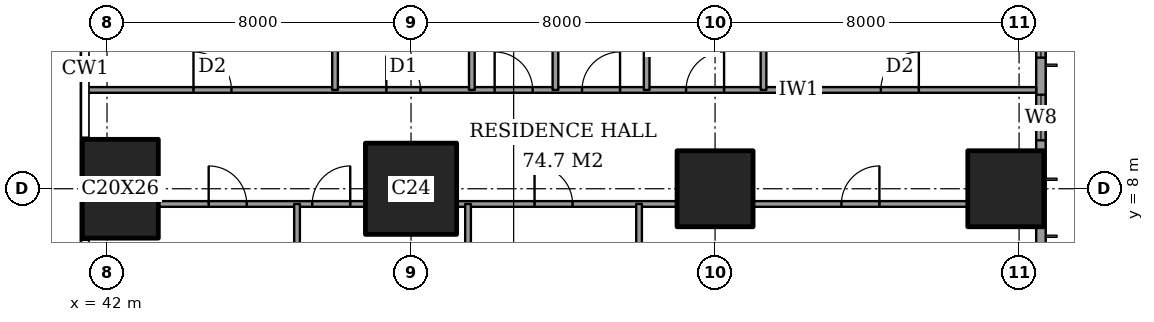
"""IFC4 building model, lengths in metres.
Left out: names, types, materials, properties, quantities, classifications, styles, units other than length and angle.
Written with IfcOpenShell. Run it as: python <this file> out.ifc"""

import sys

from ifc_helpers import new_model, si_unit, direction, frame, frame_2d, origin, origin_2d, place, context, subcontext, project, spatial, rectangle, extrude, element, fill, save


model = new_model("IFC4")
c1 = context("Model", 3, precision=1e-05, world=origin(), true_north=direction((0.0, 1.0)))
c2 = subcontext(c1, "Body", "Model", "MODEL_VIEW")
j1 = project(units=[si_unit("LENGTHUNIT", "METRE"), si_unit("PLANEANGLEUNIT", "RADIAN")], contexts=[c1])
p1 = place(None, origin())
s1 = spatial("IfcSite", under=j1, at=p1, CompositionType="ELEMENT")
p2 = place(p1, origin())
s2 = spatial("IfcBuilding", under=s1, at=p2, CompositionType="ELEMENT")
p3 = place(p2, frame((0.0, 0.0, 33.2)))
s3 = spatial("IfcBuildingStorey", under=s2, at=p3, CompositionType="ELEMENT", Elevation=33.2)
p4 = place(p3, frame((42.35, 8.0, 0.0), z_axis=(0.0, 0.0, 1.0), x_axis=(1.0, 0.0, 0.0)))
e1 = element("IfcColumn", 1, at=p4, inside=s3, PredefinedType="COLUMN", context=c2, shape_type="SweptSolid", body=[
    extrude(rectangle(XDim=2.0, YDim=2.6, at=origin_2d()), origin(), (0.0, 0.0, 1.0), 3.6),
])
p5 = place(p3, frame((50.0, 8.0, 0.0), z_axis=(0.0, 0.0, 1.0), x_axis=(1.0, 0.0, 0.0)))
e2 = element("IfcColumn", 2, at=p5, inside=s3, PredefinedType="COLUMN", context=c2, shape_type="SweptSolid", body=[
    extrude(rectangle(XDim=2.4, YDim=2.4, at=origin_2d()), origin(), (0.0, 0.0, 1.0), 3.6),
])
for number, where, z_axis, x_axis in (
    (3, (58.0, 8.0, 0.0), (0.0, 0.0, 1.0), (1.0, 0.0, 0.0)),
    (4, (65.65, 8.0, 0.0), (0.0, 0.0, 1.0), (1.0, 0.0, 0.0)),
):
    element("IfcColumn", number, at=place(p3, frame(where, z_axis=z_axis, x_axis=x_axis)), inside=s3, PredefinedType="COLUMN", context=c2, shape_type="SweptSolid", body=[
        extrude(rectangle(XDim=2.0, YDim=2.0, at=origin_2d()), origin(), (0.0, 0.0, 1.0), 3.6),
    ])
p6 = place(p3, frame((66.575, 3.175, 0.0), z_axis=(0.0, 0.0, 1.0), x_axis=(0.0, 1.0, 0.0)))
e5 = element("IfcWall", 5, at=p6, inside=s3, PredefinedType="SOLIDWALL", context=c2, shape_type="SweptSolid", body=[
    extrude(rectangle(XDim=41.65, YDim=0.25, at=frame_2d((20.825, 0.0))), origin(), (0.0, 0.0, 1.0), 3.6),
])
p7 = place(p6, frame((0.775, 0.0, 0.6)))
e6 = element("IfcOpeningElement", 6, at=p7, cuts=e5, PredefinedType="OPENING", context=c2, shape_type="SweptSolid", body=[
    extrude(rectangle(XDim=2.4, YDim=2.0, at=frame_2d((1.2, 1.0))), frame((0.0, 0.135, 0.0), z_axis=(0.0, -1.0, 0.0), x_axis=(1.0, 0.0, 0.0)), (0.0, 0.0, 1.0), 0.27),
])
p8 = place(p6, frame((6.1, 0.0, 0.6)))
e7 = element("IfcOpeningElement", 7, at=p8, cuts=e5, PredefinedType="OPENING", context=c2, shape_type="SweptSolid", body=[
    extrude(rectangle(XDim=1.2, YDim=2.0, at=frame_2d((0.6, 1.0))), frame((0.0, 0.135, 0.0), z_axis=(0.0, -1.0, 0.0), x_axis=(1.0, 0.0, 0.0)), (0.0, 0.0, 1.0), 0.27),
])
p9 = place(p6, frame((8.275, 0.0, 0.6)))
e8 = element("IfcOpeningElement", 8, at=p9, cuts=e5, PredefinedType="OPENING", context=c2, shape_type="SweptSolid", body=[
    extrude(rectangle(XDim=2.4, YDim=2.0, at=frame_2d((1.2, 1.0))), frame((0.0, 0.135, 0.0), z_axis=(0.0, -1.0, 0.0), x_axis=(1.0, 0.0, 0.0)), (0.0, 0.0, 1.0), 0.27),
])
p10 = place(p6, frame((15.775, 0.0, 0.6)))
e9 = element("IfcOpeningElement", 9, at=p10, cuts=e5, PredefinedType="OPENING", context=c2, shape_type="SweptSolid", body=[
    extrude(rectangle(XDim=2.4, YDim=2.0, at=frame_2d((1.2, 1.0))), frame((0.0, 0.135, 0.0), z_axis=(0.0, -1.0, 0.0), x_axis=(1.0, 0.0, 0.0)), (0.0, 0.0, 1.0), 0.27),
])
p11 = place(p6, frame((23.475, 0.0, 0.6)))
e10 = element("IfcOpeningElement", 10, at=p11, cuts=e5, PredefinedType="OPENING", context=c2, shape_type="SweptSolid", body=[
    extrude(rectangle(XDim=2.4, YDim=2.0, at=frame_2d((1.2, 1.0))), frame((0.0, 0.135, 0.0), z_axis=(0.0, -1.0, 0.0), x_axis=(1.0, 0.0, 0.0)), (0.0, 0.0, 1.0), 0.27),
])
p12 = place(p6, frame((30.975, 0.0, 0.6)))
e11 = element("IfcOpeningElement", 11, at=p12, cuts=e5, PredefinedType="OPENING", context=c2, shape_type="SweptSolid", body=[
    extrude(rectangle(XDim=2.4, YDim=2.0, at=frame_2d((1.2, 1.0))), frame((0.0, 0.135, 0.0), z_axis=(0.0, -1.0, 0.0), x_axis=(1.0, 0.0, 0.0)), (0.0, 0.0, 1.0), 0.27),
])
p13 = place(p6, frame((34.5, 0.0, 0.6)))
e12 = element("IfcOpeningElement", 12, at=p13, cuts=e5, PredefinedType="OPENING", context=c2, shape_type="SweptSolid", body=[
    extrude(rectangle(XDim=1.2, YDim=2.0, at=frame_2d((0.6, 1.0))), frame((0.0, 0.135, 0.0), z_axis=(0.0, -1.0, 0.0), x_axis=(1.0, 0.0, 0.0)), (0.0, 0.0, 1.0), 0.27),
])
p14 = place(p6, frame((38.475, 0.0, 0.6)))
e13 = element("IfcOpeningElement", 13, at=p14, cuts=e5, PredefinedType="OPENING", context=c2, shape_type="SweptSolid", body=[
    extrude(rectangle(XDim=2.4, YDim=2.0, at=frame_2d((1.2, 1.0))), frame((0.0, 0.135, 0.0), z_axis=(0.0, -1.0, 0.0), x_axis=(1.0, 0.0, 0.0)), (0.0, 0.0, 1.0), 0.27),
])
p15 = place(p3, frame((43.35, 7.6, 0.0), z_axis=(0.0, 0.0, 1.0), x_axis=(1.0, 0.0, 0.0)))
e14 = element("IfcWall", 14, at=p15, inside=s3, PredefinedType="PARTITIONING", context=c2, shape_type="SweptSolid", body=[
    extrude(rectangle(XDim=5.45, YDim=0.15, at=frame_2d((2.725, 0.0))), origin(), (0.0, 0.0, 1.0), 3.35),
])
p16 = place(p15, frame((4.05, 0.0, 0.0)))
e15 = element("IfcOpeningElement", 15, at=p16, cuts=e14, PredefinedType="OPENING", context=c2, shape_type="SweptSolid", body=[
    extrude(rectangle(XDim=1.0, YDim=2.1, at=frame_2d((0.5, 1.05))), frame((0.0, 0.085, 0.0), z_axis=(0.0, -1.0, 0.0), x_axis=(1.0, 0.0, 0.0)), (0.0, 0.0, 1.0), 0.17),
])
p17 = place(p15, frame((1.325, 0.0, 0.0)))
e16 = element("IfcOpeningElement", 16, at=p17, cuts=e14, PredefinedType="OPENING", context=c2, shape_type="SweptSolid", body=[
    extrude(rectangle(XDim=1.0, YDim=2.1, at=frame_2d((0.5, 1.05))), frame((0.0, 0.085, 0.0), z_axis=(0.0, -1.0, 0.0), x_axis=(1.0, 0.0, 0.0)), (0.0, 0.0, 1.0), 0.17),
])
p18 = place(p3, frame((51.2, 7.6, 0.0), z_axis=(0.0, 0.0, 1.0), x_axis=(1.0, 0.0, 0.0)))
e17 = element("IfcWall", 17, at=p18, inside=s3, PredefinedType="PARTITIONING", context=c2, shape_type="SweptSolid", body=[
    extrude(rectangle(XDim=5.8, YDim=0.15, at=frame_2d((2.9, 0.0))), origin(), (0.0, 0.0, 1.0), 3.35),
])
p19 = place(p18, frame((2.05, 0.0, 0.0)))
e18 = element("IfcOpeningElement", 18, at=p19, cuts=e17, PredefinedType="OPENING", context=c2, shape_type="SweptSolid", body=[
    extrude(rectangle(XDim=1.0, YDim=2.1, at=frame_2d((0.5, 1.05))), frame((0.0, 0.085, 0.0), z_axis=(0.0, -1.0, 0.0), x_axis=(1.0, 0.0, 0.0)), (0.0, 0.0, 1.0), 0.17),
])
p20 = place(p3, frame((59.0, 7.6, 0.0), z_axis=(0.0, 0.0, 1.0), x_axis=(1.0, 0.0, 0.0)))
e19 = element("IfcWall", 19, at=p20, inside=s3, PredefinedType="PARTITIONING", context=c2, shape_type="SweptSolid", body=[
    extrude(rectangle(XDim=5.65, YDim=0.15, at=frame_2d((2.825, 0.0))), origin(), (0.0, 0.0, 1.0), 3.35),
])
p21 = place(p20, frame((2.325, 0.0, 0.0)))
e20 = element("IfcOpeningElement", 20, at=p21, cuts=e19, PredefinedType="OPENING", context=c2, shape_type="SweptSolid", body=[
    extrude(rectangle(XDim=1.0, YDim=2.1, at=frame_2d((0.5, 1.05))), frame((0.0, 0.085, 0.0), z_axis=(0.0, -1.0, 0.0), x_axis=(1.0, 0.0, 0.0)), (0.0, 0.0, 1.0), 0.17),
])
p22 = place(p3, frame((41.439, 10.6, 0.0), z_axis=(0.0, 0.0, 1.0), x_axis=(1.0, 0.0, 0.0)))
e21 = element("IfcWall", 21, at=p22, inside=s3, PredefinedType="PARTITIONING", context=c2, shape_type="SweptSolid", body=[
    extrude(rectangle(XDim=25.011, YDim=0.15, at=frame_2d((12.505, 0.0))), origin(), (0.0, 0.0, 1.0), 3.35),
])
p23 = place(p22, frame((10.761, 0.0, 0.0)))
e22 = element("IfcOpeningElement", 22, at=p23, cuts=e21, PredefinedType="OPENING", context=c2, shape_type="SweptSolid", body=[
    extrude(rectangle(XDim=1.0, YDim=2.1, at=frame_2d((0.5, 1.05))), frame((0.0, 0.085, 0.0), z_axis=(0.0, -1.0, 0.0), x_axis=(1.0, 0.0, 0.0)), (0.0, 0.0, 1.0), 0.17),
])
p24 = place(p22, frame((20.924, 0.0, 0.0)))
e23 = element("IfcOpeningElement", 23, at=p24, cuts=e21, PredefinedType="OPENING", context=c2, shape_type="SweptSolid", body=[
    extrude(rectangle(XDim=1.0, YDim=2.1, at=frame_2d((0.5, 1.05))), frame((0.0, 0.085, 0.0), z_axis=(0.0, -1.0, 0.0), x_axis=(1.0, 0.0, 0.0)), (0.0, 0.0, 1.0), 0.17),
])
p25 = place(p22, frame((15.799, 0.0, 0.0)))
e24 = element("IfcOpeningElement", 24, at=p25, cuts=e21, PredefinedType="OPENING", context=c2, shape_type="SweptSolid", body=[
    extrude(rectangle(XDim=1.0, YDim=2.1, at=frame_2d((0.5, 1.05))), frame((0.0, 0.085, 0.0), z_axis=(0.0, -1.0, 0.0), x_axis=(1.0, 0.0, 0.0)), (0.0, 0.0, 1.0), 0.17),
])
p26 = place(p22, frame((13.061, 0.0, 0.0)))
e25 = element("IfcOpeningElement", 25, at=p26, cuts=e21, PredefinedType="OPENING", context=c2, shape_type="SweptSolid", body=[
    extrude(rectangle(XDim=1.0, YDim=2.1, at=frame_2d((0.5, 1.05))), frame((0.0, 0.085, 0.0), z_axis=(0.0, -1.0, 0.0), x_axis=(1.0, 0.0, 0.0)), (0.0, 0.0, 1.0), 0.17),
])
p27 = place(p22, frame((7.911, 0.0, 0.0)))
e26 = element("IfcOpeningElement", 26, at=p27, cuts=e21, PredefinedType="OPENING", context=c2, shape_type="SweptSolid", body=[
    extrude(rectangle(XDim=0.9, YDim=2.1, at=frame_2d((0.45, 1.05))), frame((0.0, 0.085, 0.0), z_axis=(0.0, -1.0, 0.0), x_axis=(1.0, 0.0, 0.0)), (0.0, 0.0, 1.0), 0.17),
])
p28 = place(p22, frame((2.836, 0.0, 0.0)))
e27 = element("IfcOpeningElement", 27, at=p28, cuts=e21, PredefinedType="OPENING", context=c2, shape_type="SweptSolid", body=[
    extrude(rectangle(XDim=1.0, YDim=2.1, at=frame_2d((0.5, 1.05))), frame((0.0, 0.085, 0.0), z_axis=(0.0, -1.0, 0.0), x_axis=(1.0, 0.0, 0.0)), (0.0, 0.0, 1.0), 0.17),
])
p29 = place(p3, frame((47.0, -0.45, 0.0), z_axis=(0.0, 0.0, 1.0), x_axis=(0.0, 1.0, 0.0)))
e28 = element("IfcWall", 28, at=p29, inside=s3, PredefinedType="PARTITIONING", context=c2, shape_type="SweptSolid", body=[
    extrude(rectangle(XDim=8.05, YDim=0.15, at=frame_2d((4.025, 0.0))), origin(), (0.0, 0.0, 1.0), 3.35),
])
p30 = place(p3, frame((48.0, 10.6, 0.0), z_axis=(0.0, 0.0, 1.0), x_axis=(0.0, 1.0, 0.0)))
e29 = element("IfcWall", 29, at=p30, inside=s3, PredefinedType="PARTITIONING", context=c2, shape_type="SweptSolid", body=[
    extrude(rectangle(XDim=13.4, YDim=0.15, at=frame_2d((6.7, 0.0))), origin(), (0.0, 0.0, 1.0), 3.35),
])
p31 = place(p30, frame((10.8, 0.0, 0.0)))
e30 = element("IfcOpeningElement", 30, at=p31, cuts=e29, PredefinedType="OPENING", context=c2, shape_type="SweptSolid", body=[
    extrude(rectangle(XDim=1.2, YDim=2.4, at=frame_2d((0.6, 1.2))), frame((0.0, 0.085, 0.0), z_axis=(0.0, -1.0, 0.0), x_axis=(1.0, 0.0, 0.0)), (0.0, 0.0, 1.0), 0.17),
])
p32 = place(p30, frame((6.7, 0.0, 0.0)))
e31 = element("IfcOpeningElement", 31, at=p32, cuts=e29, PredefinedType="OPENING", context=c2, shape_type="SweptSolid", body=[
    extrude(rectangle(XDim=0.9, YDim=2.1, at=frame_2d((0.45, 1.05))), frame((0.0, 0.085, 0.0), z_axis=(0.0, -1.0, 0.0), x_axis=(1.0, 0.0, 0.0)), (0.0, 0.0, 1.0), 0.17),
])
p33 = place(p3, frame((51.5, -0.45, 0.0), z_axis=(0.0, 0.0, 1.0), x_axis=(0.0, 1.0, 0.0)))
e32 = element("IfcWall", 32, at=p33, inside=s3, PredefinedType="PARTITIONING", context=c2, shape_type="SweptSolid", body=[
    extrude(rectangle(XDim=8.05, YDim=0.15, at=frame_2d((4.025, 0.0))), origin(), (0.0, 0.0, 1.0), 3.35),
])
for number, where, z_axis, x_axis in (
    (33, (51.6, 10.6, 0.0), (0.0, 0.0, 1.0), (0.0, 1.0, 0.0)),
    (34, (53.8, 10.6, 0.0), (0.0, 0.0, 1.0), (0.0, 1.0, 0.0)),
):
    element("IfcWall", number, at=place(p3, frame(where, z_axis=z_axis, x_axis=x_axis)), inside=s3, PredefinedType="PARTITIONING", context=c2, shape_type="SweptSolid", body=[
        extrude(rectangle(XDim=4.0, YDim=0.15, at=frame_2d((2.0, 0.0))), origin(), (0.0, 0.0, 1.0), 3.35),
    ])
p34 = place(p3, frame((56.0, -0.45, 0.0), z_axis=(0.0, 0.0, 1.0), x_axis=(0.0, 1.0, 0.0)))
e35 = element("IfcWall", 35, at=p34, inside=s3, PredefinedType="PARTITIONING", context=c2, shape_type="SweptSolid", body=[
    extrude(rectangle(XDim=8.05, YDim=0.15, at=frame_2d((4.025, 0.0))), origin(), (0.0, 0.0, 1.0), 3.35),
])
p35 = place(p3, frame((56.2, 10.6, 0.0), z_axis=(0.0, 0.0, 1.0), x_axis=(0.0, 1.0, 0.0)))
e36 = element("IfcWall", 36, at=p35, inside=s3, PredefinedType="PARTITIONING", context=c2, shape_type="SweptSolid", body=[
    extrude(rectangle(XDim=11.0, YDim=0.15, at=frame_2d((5.5, 0.0))), origin(), (0.0, 0.0, 1.0), 3.35),
])
p36 = place(p35, frame((7.0, 0.0, 0.0)))
e37 = element("IfcOpeningElement", 37, at=p36, cuts=e36, PredefinedType="OPENING", context=c2, shape_type="SweptSolid", body=[
    extrude(rectangle(XDim=1.0, YDim=2.1, at=frame_2d((0.5, 1.05))), frame((0.0, 0.085, 0.0), z_axis=(0.0, -1.0, 0.0), x_axis=(1.0, 0.0, 0.0)), (0.0, 0.0, 1.0), 0.17),
])
p37 = place(p3, frame((59.275, 10.6, 0.0), z_axis=(0.0, 0.0, 1.0), x_axis=(0.0, 1.0, 0.0)))
e38 = element("IfcWall", 38, at=p37, inside=s3, PredefinedType="PARTITIONING", context=c2, shape_type="SweptSolid", body=[
    extrude(rectangle(XDim=4.2, YDim=0.15, at=frame_2d((2.1, 0.0))), origin(), (0.0, 0.0, 1.0), 3.35),
])
p38 = place(p8, origin())
e39 = element("IfcWindow", 39, at=p38, inside=s3, PartitioningType="SINGLE_PANEL", PredefinedType="WINDOW", context=c2, shape_type="SweptSolid", body=[
    extrude(rectangle(XDim=1.2, YDim=2.0, at=frame_2d((0.6, 1.0))), frame((0.0, 0.03, 0.0), z_axis=(0.0, -1.0, 0.0), x_axis=(1.0, 0.0, 0.0)), (0.0, 0.0, 1.0), 0.06),
])
fill(e7, e39)
p39 = place(p9, origin())
e40 = element("IfcWindow", 40, at=p39, inside=s3, PartitioningType="SINGLE_PANEL", PredefinedType="WINDOW", context=c2, shape_type="SweptSolid", body=[
    extrude(rectangle(XDim=2.4, YDim=2.0, at=frame_2d((1.2, 1.0))), frame((0.0, 0.03, 0.0), z_axis=(0.0, -1.0, 0.0), x_axis=(1.0, 0.0, 0.0)), (0.0, 0.0, 1.0), 0.06),
])
fill(e8, e40)
p40 = place(p21, origin())
e41 = element("IfcDoor", 41, at=p40, inside=s3, OperationType="SINGLE_SWING_LEFT", PredefinedType="DOOR", context=c2, shape_type="SweptSolid", body=[
    extrude(rectangle(XDim=1.0, YDim=2.1, at=frame_2d((0.5, 1.05))), frame((0.0, 0.025, 0.0), z_axis=(0.0, -1.0, 0.0), x_axis=(1.0, 0.0, 0.0)), (0.0, 0.0, 1.0), 0.05),
])
fill(e20, e41)
p41 = place(p19, origin())
e42 = element("IfcDoor", 42, at=p41, inside=s3, OperationType="SINGLE_SWING_RIGHT", PredefinedType="DOOR", context=c2, shape_type="SweptSolid", body=[
    extrude(rectangle(XDim=1.0, YDim=2.1, at=frame_2d((0.5, 1.05))), frame((0.0, 0.025, 0.0), z_axis=(0.0, -1.0, 0.0), x_axis=(1.0, 0.0, 0.0)), (0.0, 0.0, 1.0), 0.05),
])
fill(e18, e42)
p42 = place(p16, origin())
e43 = element("IfcDoor", 43, at=p42, inside=s3, OperationType="SINGLE_SWING_LEFT", PredefinedType="DOOR", context=c2, shape_type="SweptSolid", body=[
    extrude(rectangle(XDim=1.0, YDim=2.1, at=frame_2d((0.5, 1.05))), frame((0.0, 0.025, 0.0), z_axis=(0.0, -1.0, 0.0), x_axis=(1.0, 0.0, 0.0)), (0.0, 0.0, 1.0), 0.05),
])
fill(e15, e43)
p43 = place(p17, origin())
e44 = element("IfcDoor", 44, at=p43, inside=s3, OperationType="SINGLE_SWING_RIGHT", PredefinedType="DOOR", context=c2, shape_type="SweptSolid", body=[
    extrude(rectangle(XDim=1.0, YDim=2.1, at=frame_2d((0.5, 1.05))), frame((0.0, 0.025, 0.0), z_axis=(0.0, -1.0, 0.0), x_axis=(1.0, 0.0, 0.0)), (0.0, 0.0, 1.0), 0.05),
])
fill(e16, e44)
p44 = place(p23, origin())
e45 = element("IfcDoor", 45, at=p44, inside=s3, OperationType="SINGLE_SWING_RIGHT", PredefinedType="DOOR", context=c2, shape_type="SweptSolid", body=[
    extrude(rectangle(XDim=1.0, YDim=2.1, at=frame_2d((0.5, 1.05))), frame((0.0, 0.025, 0.0), z_axis=(0.0, -1.0, 0.0), x_axis=(1.0, 0.0, 0.0)), (0.0, 0.0, 1.0), 0.05),
])
fill(e22, e45)
p45 = place(p24, origin())
e46 = element("IfcDoor", 46, at=p45, inside=s3, OperationType="SINGLE_SWING_LEFT", PredefinedType="DOOR", context=c2, shape_type="SweptSolid", body=[
    extrude(rectangle(XDim=1.0, YDim=2.1, at=frame_2d((0.5, 1.05))), frame((0.0, 0.025, 0.0), z_axis=(0.0, -1.0, 0.0), x_axis=(1.0, 0.0, 0.0)), (0.0, 0.0, 1.0), 0.05),
])
fill(e23, e46)
p46 = place(p25, origin())
e47 = element("IfcDoor", 47, at=p46, inside=s3, OperationType="SINGLE_SWING_LEFT", PredefinedType="DOOR", context=c2, shape_type="SweptSolid", body=[
    extrude(rectangle(XDim=1.0, YDim=2.1, at=frame_2d((0.5, 1.05))), frame((0.0, 0.025, 0.0), z_axis=(0.0, -1.0, 0.0), x_axis=(1.0, 0.0, 0.0)), (0.0, 0.0, 1.0), 0.05),
])
fill(e24, e47)
p47 = place(p26, origin())
e48 = element("IfcDoor", 48, at=p47, inside=s3, OperationType="SINGLE_SWING_LEFT", PredefinedType="DOOR", context=c2, shape_type="SweptSolid", body=[
    extrude(rectangle(XDim=1.0, YDim=2.1, at=frame_2d((0.5, 1.05))), frame((0.0, 0.025, 0.0), z_axis=(0.0, -1.0, 0.0), x_axis=(1.0, 0.0, 0.0)), (0.0, 0.0, 1.0), 0.05),
])
fill(e25, e48)
p48 = place(p27, origin())
e49 = element("IfcDoor", 49, at=p48, inside=s3, OperationType="SINGLE_SWING_RIGHT", PredefinedType="DOOR", context=c2, shape_type="SweptSolid", body=[
    extrude(rectangle(XDim=0.9, YDim=2.1, at=frame_2d((0.45, 1.05))), frame((0.0, 0.025, 0.0), z_axis=(0.0, -1.0, 0.0), x_axis=(1.0, 0.0, 0.0)), (0.0, 0.0, 1.0), 0.05),
])
fill(e26, e49)
p49 = place(p28, origin())
e50 = element("IfcDoor", 50, at=p49, inside=s3, OperationType="SINGLE_SWING_RIGHT", PredefinedType="DOOR", context=c2, shape_type="SweptSolid", body=[
    extrude(rectangle(XDim=1.0, YDim=2.1, at=frame_2d((0.5, 1.05))), frame((0.0, 0.025, 0.0), z_axis=(0.0, -1.0, 0.0), x_axis=(1.0, 0.0, 0.0)), (0.0, 0.0, 1.0), 0.05),
])
fill(e27, e50)
save(model, sys.argv[1])
